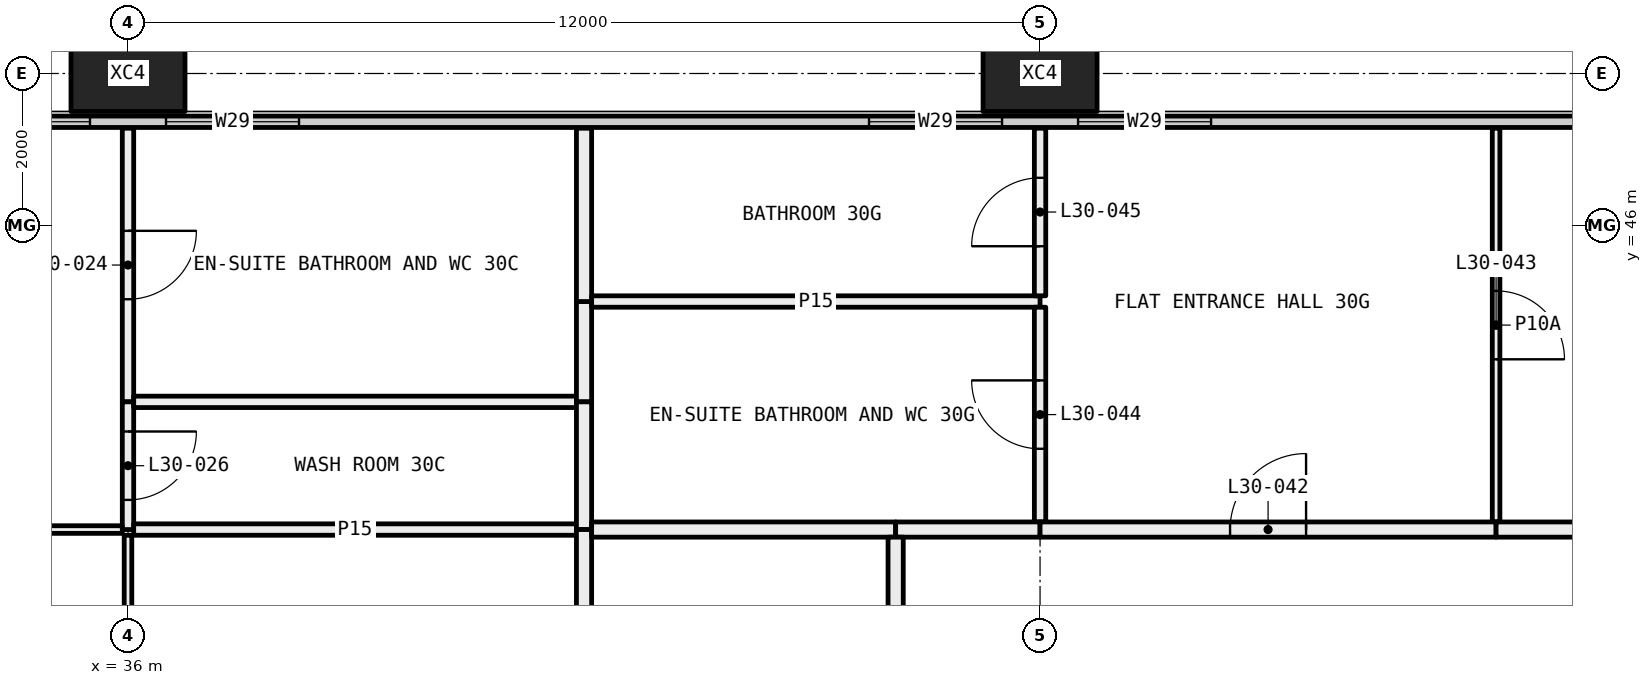
"""IFC4 building model, lengths in metres.
Left out: names, types, materials, properties, quantities, classifications, styles, units other than length and angle.
Written with IfcOpenShell. Run it as: python <this file> out.ifc"""

import sys

from ifc_helpers import new_model, si_unit, direction, frame, frame_2d, origin, origin_2d, place, context, subcontext, project, spatial, rectangle, hollow_rectangle, extrude, element, fill, save


model = new_model("IFC4")
c1 = context("Model", 3, precision=1e-05, world=origin(), true_north=direction((0.0, 1.0)))
c2 = subcontext(c1, "Body", "Model", "MODEL_VIEW")
j1 = project(units=[si_unit("LENGTHUNIT", "METRE"), si_unit("PLANEANGLEUNIT", "RADIAN")], contexts=[c1])
p1 = place(None, origin())
s1 = spatial("IfcSite", under=j1, at=p1, CompositionType="ELEMENT")
p2 = place(p1, origin())
s2 = spatial("IfcBuilding", under=s1, at=p2, CompositionType="ELEMENT")
p3 = place(p2, frame((0.0, 0.0, 117.3)))
s3 = spatial("IfcBuildingStorey", under=s2, at=p3, CompositionType="ELEMENT", Elevation=117.3)
for number, where, z_axis, x_axis in (
    (1, (36.0, 48.0, -0.4), (0.0, 0.0, 1.0), (1.0, 0.0, 0.0)),
    (2, (48.0, 48.0, -0.4), (0.0, 0.0, 1.0), (1.0, 0.0, 0.0)),
):
    element("IfcColumn", number, at=place(p3, frame(where, z_axis=z_axis, x_axis=x_axis)), inside=s3, PredefinedType="COLUMN", context=c2, shape_type="SweptSolid", body=[
        extrude(hollow_rectangle(XDim=1.5, YDim=1.0, WallThickness=0.06, at=origin_2d()), origin(), (0.0, 0.0, 1.0), 3.45),
    ])
p4 = place(p3, frame((6.56, 47.365, 0.0), z_axis=(0.0, 0.0, 1.0), x_axis=(1.0, 0.0, 0.0)))
e3 = element("IfcWall", 3, at=p4, inside=s3, PredefinedType="ELEMENTEDWALL", context=c2, shape_type="SweptSolid", body=[
    extrude(rectangle(XDim=58.88, YDim=0.15, at=frame_2d((29.44, 0.0))), origin(), (0.0, 0.0, 1.0), 3.05),
])
p5 = place(p4, frame((0.44, 0.0, 0.45)))
e4 = element("IfcOpeningElement", 4, at=p5, cuts=e3, PredefinedType="OPENING", context=c2, shape_type="SweptSolid", body=[
    extrude(rectangle(XDim=4.5, YDim=2.55, at=frame_2d((2.25, 1.275))), frame((0.0, 0.085, 0.0), z_axis=(0.0, -1.0, 0.0), x_axis=(1.0, 0.0, 0.0)), (0.0, 0.0, 1.0), 0.17),
])
p6 = place(p4, frame((5.94, 0.0, 0.45)))
e5 = element("IfcOpeningElement", 5, at=p6, cuts=e3, PredefinedType="OPENING", context=c2, shape_type="SweptSolid", body=[
    extrude(rectangle(XDim=1.75, YDim=2.55, at=frame_2d((0.875, 1.275))), frame((0.0, 0.085, 0.0), z_axis=(0.0, -1.0, 0.0), x_axis=(1.0, 0.0, 0.0)), (0.0, 0.0, 1.0), 0.17),
])
p7 = place(p4, frame((15.19, 0.0, 0.45)))
e6 = element("IfcOpeningElement", 6, at=p7, cuts=e3, PredefinedType="OPENING", context=c2, shape_type="SweptSolid", body=[
    extrude(rectangle(XDim=1.75, YDim=2.55, at=frame_2d((0.875, 1.275))), frame((0.0, 0.085, 0.0), z_axis=(0.0, -1.0, 0.0), x_axis=(1.0, 0.0, 0.0)), (0.0, 0.0, 1.0), 0.17),
])
p8 = place(p4, frame((17.94, 0.0, 0.45)))
e7 = element("IfcOpeningElement", 7, at=p8, cuts=e3, PredefinedType="OPENING", context=c2, shape_type="SweptSolid", body=[
    extrude(rectangle(XDim=1.75, YDim=2.55, at=frame_2d((0.875, 1.275))), frame((0.0, 0.085, 0.0), z_axis=(0.0, -1.0, 0.0), x_axis=(1.0, 0.0, 0.0)), (0.0, 0.0, 1.0), 0.17),
])
p9 = place(p4, frame((27.19, 0.0, 0.45)))
e8 = element("IfcOpeningElement", 8, at=p9, cuts=e3, PredefinedType="OPENING", context=c2, shape_type="SweptSolid", body=[
    extrude(rectangle(XDim=1.75, YDim=2.55, at=frame_2d((0.875, 1.275))), frame((0.0, 0.085, 0.0), z_axis=(0.0, -1.0, 0.0), x_axis=(1.0, 0.0, 0.0)), (0.0, 0.0, 1.0), 0.17),
])
p10 = place(p4, frame((29.94, 0.0, 0.45)))
e9 = element("IfcOpeningElement", 9, at=p10, cuts=e3, PredefinedType="OPENING", context=c2, shape_type="SweptSolid", body=[
    extrude(rectangle(XDim=1.75, YDim=2.55, at=frame_2d((0.875, 1.275))), frame((0.0, 0.085, 0.0), z_axis=(0.0, -1.0, 0.0), x_axis=(1.0, 0.0, 0.0)), (0.0, 0.0, 1.0), 0.17),
])
p11 = place(p4, frame((39.19, 0.0, 0.45)))
e10 = element("IfcOpeningElement", 10, at=p11, cuts=e3, PredefinedType="OPENING", context=c2, shape_type="SweptSolid", body=[
    extrude(rectangle(XDim=1.75, YDim=2.55, at=frame_2d((0.875, 1.275))), frame((0.0, 0.085, 0.0), z_axis=(0.0, -1.0, 0.0), x_axis=(1.0, 0.0, 0.0)), (0.0, 0.0, 1.0), 0.17),
])
p12 = place(p4, frame((41.94, 0.0, 0.45)))
e11 = element("IfcOpeningElement", 11, at=p12, cuts=e3, PredefinedType="OPENING", context=c2, shape_type="SweptSolid", body=[
    extrude(rectangle(XDim=1.75, YDim=2.55, at=frame_2d((0.875, 1.275))), frame((0.0, 0.085, 0.0), z_axis=(0.0, -1.0, 0.0), x_axis=(1.0, 0.0, 0.0)), (0.0, 0.0, 1.0), 0.17),
])
p13 = place(p4, frame((51.19, 0.0, 0.45)))
e12 = element("IfcOpeningElement", 12, at=p13, cuts=e3, PredefinedType="OPENING", context=c2, shape_type="SweptSolid", body=[
    extrude(rectangle(XDim=1.75, YDim=2.55, at=frame_2d((0.875, 1.275))), frame((0.0, 0.085, 0.0), z_axis=(0.0, -1.0, 0.0), x_axis=(1.0, 0.0, 0.0)), (0.0, 0.0, 1.0), 0.17),
])
p14 = place(p4, frame((53.94, 0.0, 0.45)))
e13 = element("IfcOpeningElement", 13, at=p14, cuts=e3, PredefinedType="OPENING", context=c2, shape_type="SweptSolid", body=[
    extrude(rectangle(XDim=4.5, YDim=2.55, at=frame_2d((2.25, 1.275))), frame((0.0, 0.085, 0.0), z_axis=(0.0, -1.0, 0.0), x_axis=(1.0, 0.0, 0.0)), (0.0, 0.0, 1.0), 0.17),
])
p15 = place(p3, frame((36.0, 43.68, 0.0), z_axis=(0.0, 0.0, 1.0), x_axis=(0.0, 1.0, 0.0)))
e14 = element("IfcWall", 14, at=p15, inside=s3, PredefinedType="PARTITIONING", context=c2, shape_type="SweptSolid", body=[
    extrude(rectangle(XDim=3.6, YDim=0.15, at=frame_2d((1.8, 0.0))), origin(), (0.0, 0.0, 1.0), 2.45),
])
p16 = place(p15, frame((1.35, 0.0, 0.0)))
e15 = element("IfcOpeningElement", 15, at=p16, cuts=e14, PredefinedType="OPENING", context=c2, shape_type="SweptSolid", body=[
    extrude(rectangle(XDim=0.9, YDim=2.1, at=frame_2d((0.45, 1.05))), frame((0.0, 0.085, 0.0), z_axis=(0.0, -1.0, 0.0), x_axis=(1.0, 0.0, 0.0)), (0.0, 0.0, 1.0), 0.17),
])
p17 = place(p3, frame((36.0, 42.0, 0.0), z_axis=(0.0, 0.0, 1.0), x_axis=(0.0, 1.0, 0.0)))
e16 = element("IfcWall", 16, at=p17, inside=s3, PredefinedType="PARTITIONING", context=c2, shape_type="SweptSolid", body=[
    extrude(rectangle(XDim=1.68, YDim=0.15, at=frame_2d((0.84, 0.0))), origin(), (0.0, 0.0, 1.0), 2.45),
])
p18 = place(p17, frame((0.39, 0.0, 0.0)))
e17 = element("IfcOpeningElement", 17, at=p18, cuts=e16, PredefinedType="OPENING", context=c2, shape_type="SweptSolid", body=[
    extrude(rectangle(XDim=0.9, YDim=2.1, at=frame_2d((0.45, 1.05))), frame((0.0, 0.085, 0.0), z_axis=(0.0, -1.0, 0.0), x_axis=(1.0, 0.0, 0.0)), (0.0, 0.0, 1.0), 0.17),
])
p19 = place(p3, frame((31.5, 42.0, 0.0), z_axis=(0.0, 0.0, 1.0), x_axis=(1.0, 0.0, 0.0)))
e18 = element("IfcWall", 18, at=p19, inside=s3, PredefinedType="PARTITIONING", context=c2, shape_type="SweptSolid", body=[
    extrude(rectangle(XDim=4.425, YDim=0.1, at=frame_2d((2.212, 0.0))), origin(), (0.0, 0.0, 1.0), 2.45),
])
p20 = place(p19, frame((1.762, 0.0, 0.0)))
e19 = element("IfcOpeningElement", 19, at=p20, cuts=e18, PredefinedType="OPENING", context=c2, shape_type="SweptSolid", body=[
    extrude(rectangle(XDim=0.9, YDim=2.1, at=frame_2d((0.45, 1.05))), frame((0.0, 0.06, 0.0), z_axis=(0.0, -1.0, 0.0), x_axis=(1.0, 0.0, 0.0)), (0.0, 0.0, 1.0), 0.12),
])
p21 = place(p3, frame((36.075, 43.68, 0.0), z_axis=(0.0, 0.0, 1.0), x_axis=(1.0, 0.0, 0.0)))
e20 = element("IfcWall", 20, at=p21, inside=s3, PredefinedType="PARTITIONING", context=c2, shape_type="SweptSolid", body=[
    extrude(rectangle(XDim=5.825, YDim=0.15, at=frame_2d((2.913, 0.0))), origin(), (0.0, 0.0, 1.0), 2.45),
])
p22 = place(p3, frame((42.0, 43.68, 0.0), z_axis=(0.0, 0.0, 1.0), x_axis=(0.0, 1.0, 0.0)))
e21 = element("IfcWall", 21, at=p22, inside=s3, PredefinedType="PARTITIONING", context=c2, shape_type="SweptSolid", body=[
    extrude(rectangle(XDim=1.32, YDim=0.2, at=frame_2d((0.66, 0.0))), origin(), (0.0, 0.0, 1.0), 3.05),
])
p23 = place(p3, frame((42.0, 45.0, 0.0), z_axis=(0.0, 0.0, 1.0), x_axis=(0.0, 1.0, 0.0)))
e22 = element("IfcWall", 22, at=p23, inside=s3, PredefinedType="PARTITIONING", context=c2, shape_type="SweptSolid", body=[
    extrude(rectangle(XDim=2.28, YDim=0.2, at=frame_2d((1.14, 0.0))), origin(), (0.0, 0.0, 1.0), 3.05),
])
p24 = place(p3, frame((36.075, 42.0, 0.0), z_axis=(0.0, 0.0, 1.0), x_axis=(1.0, 0.0, 0.0)))
e23 = element("IfcWall", 23, at=p24, inside=s3, PredefinedType="PARTITIONING", context=c2, shape_type="SweptSolid", body=[
    extrude(rectangle(XDim=5.825, YDim=0.15, at=frame_2d((2.913, 0.0))), origin(), (0.0, 0.0, 1.0), 2.45),
])
p25 = place(p3, frame((42.0, 42.0, 0.0), z_axis=(0.0, 0.0, 1.0), x_axis=(0.0, 1.0, 0.0)))
e24 = element("IfcWall", 24, at=p25, inside=s3, PredefinedType="PARTITIONING", context=c2, shape_type="SweptSolid", body=[
    extrude(rectangle(XDim=1.68, YDim=0.2, at=frame_2d((0.84, 0.0))), origin(), (0.0, 0.0, 1.0), 3.05),
])
p26 = place(p3, frame((36.0, 36.75, 0.0), z_axis=(0.0, 0.0, 1.0), x_axis=(0.0, 1.0, 0.0)))
e25 = element("IfcWall", 25, at=p26, inside=s3, PredefinedType="PARTITIONING", context=c2, shape_type="SweptSolid", body=[
    extrude(rectangle(XDim=5.175, YDim=0.1, at=frame_2d((2.587, 0.0))), origin(), (0.0, 0.0, 1.0), 2.45),
])
p27 = place(p26, frame((2.137, 0.0, 0.0)))
e26 = element("IfcOpeningElement", 26, at=p27, cuts=e25, PredefinedType="OPENING", context=c2, shape_type="SweptSolid", body=[
    extrude(rectangle(XDim=0.9, YDim=2.1, at=frame_2d((0.45, 1.05))), frame((0.0, 0.06, 0.0), z_axis=(0.0, -1.0, 0.0), x_axis=(1.0, 0.0, 0.0)), (0.0, 0.0, 1.0), 0.12),
])
p28 = place(p3, frame((42.0, 36.1, 0.0), z_axis=(0.0, 0.0, 1.0), x_axis=(0.0, 1.0, 0.0)))
e27 = element("IfcWall", 27, at=p28, inside=s3, PredefinedType="PARTITIONING", context=c2, shape_type="SweptSolid", body=[
    extrude(rectangle(XDim=5.9, YDim=0.2, at=frame_2d((2.95, 0.0))), origin(), (0.0, 0.0, 1.0), 3.05),
])
p29 = place(p3, frame((48.0, 45.0, 0.0), z_axis=(0.0, 0.0, 1.0), x_axis=(-1.0, 0.0, 0.0)))
e28 = element("IfcWall", 28, at=p29, inside=s3, PredefinedType="PARTITIONING", context=c2, shape_type="SweptSolid", body=[
    extrude(rectangle(XDim=5.9, YDim=0.15, at=frame_2d((2.95, 0.0))), origin(), (0.0, 0.0, 1.0), 3.05),
])
p30 = place(p3, frame((48.0, 42.1, 0.0), z_axis=(0.0, 0.0, 1.0), x_axis=(0.0, 1.0, 0.0)))
e29 = element("IfcWall", 29, at=p30, inside=s3, PredefinedType="PARTITIONING", context=c2, shape_type="SweptSolid", body=[
    extrude(rectangle(XDim=2.825, YDim=0.15, at=frame_2d((1.413, 0.0))), origin(), (0.0, 0.0, 1.0), 3.05),
])
p31 = place(p30, frame((0.962, 0.0, 0.0)))
e30 = element("IfcOpeningElement", 30, at=p31, cuts=e29, PredefinedType="OPENING", context=c2, shape_type="SweptSolid", body=[
    extrude(rectangle(XDim=0.9, YDim=2.1, at=frame_2d((0.45, 1.05))), frame((0.0, 0.085, 0.0), z_axis=(0.0, -1.0, 0.0), x_axis=(1.0, 0.0, 0.0)), (0.0, 0.0, 1.0), 0.17),
])
p32 = place(p3, frame((42.1, 42.0, 0.0), z_axis=(0.0, 0.0, 1.0), x_axis=(1.0, 0.0, 0.0)))
e31 = element("IfcWall", 31, at=p32, inside=s3, PredefinedType="PARTITIONING", context=c2, shape_type="SweptSolid", body=[
    extrude(rectangle(XDim=4.0, YDim=0.2, at=frame_2d((2.0, 0.0))), origin(), (0.0, 0.0, 1.0), 3.05),
])
p33 = place(p3, frame((46.1, 42.0, 0.0), z_axis=(0.0, 0.0, 1.0), x_axis=(1.0, 0.0, 0.0)))
e32 = element("IfcWall", 32, at=p33, inside=s3, PredefinedType="PARTITIONING", context=c2, shape_type="SweptSolid", body=[
    extrude(rectangle(XDim=1.9, YDim=0.2, at=frame_2d((0.95, 0.0))), origin(), (0.0, 0.0, 1.0), 3.05),
])
p34 = place(p3, frame((48.0, 45.075, 0.0), z_axis=(0.0, 0.0, 1.0), x_axis=(0.0, 1.0, 0.0)))
e33 = element("IfcWall", 33, at=p34, inside=s3, PredefinedType="PARTITIONING", context=c2, shape_type="SweptSolid", body=[
    extrude(rectangle(XDim=2.205, YDim=0.15, at=frame_2d((1.103, 0.0))), origin(), (0.0, 0.0, 1.0), 3.05),
])
p35 = place(p34, frame((0.653, 0.0, 0.0)))
e34 = element("IfcOpeningElement", 34, at=p35, cuts=e33, PredefinedType="OPENING", context=c2, shape_type="SweptSolid", body=[
    extrude(rectangle(XDim=0.9, YDim=2.1, at=frame_2d((0.45, 1.05))), frame((0.0, 0.085, 0.0), z_axis=(0.0, -1.0, 0.0), x_axis=(1.0, 0.0, 0.0)), (0.0, 0.0, 1.0), 0.17),
])
p36 = place(p3, frame((54.0, 42.1, 0.0), z_axis=(0.0, 0.0, 1.0), x_axis=(0.0, 1.0, 0.0)))
e35 = element("IfcWall", 35, at=p36, inside=s3, PredefinedType="PARTITIONING", context=c2, shape_type="SweptSolid", body=[
    extrude(rectangle(XDim=5.18, YDim=0.1, at=frame_2d((2.59, 0.0))), origin(), (0.0, 0.0, 1.0), 3.05),
])
p37 = place(p36, frame((2.14, 0.0, 0.0)))
e36 = element("IfcOpeningElement", 36, at=p37, cuts=e35, PredefinedType="OPENING", context=c2, shape_type="SweptSolid", body=[
    extrude(rectangle(XDim=0.9, YDim=2.1, at=frame_2d((0.45, 1.05))), frame((0.0, 0.06, 0.0), z_axis=(0.0, -1.0, 0.0), x_axis=(1.0, 0.0, 0.0)), (0.0, 0.0, 1.0), 0.12),
])
p38 = place(p3, frame((48.0, 42.0, 0.0), z_axis=(0.0, 0.0, 1.0), x_axis=(1.0, 0.0, 0.0)))
e37 = element("IfcWall", 37, at=p38, inside=s3, PredefinedType="PARTITIONING", context=c2, shape_type="SweptSolid", body=[
    extrude(rectangle(XDim=6.0, YDim=0.2, at=frame_2d((3.0, 0.0))), origin(), (0.0, 0.0, 1.0), 3.05),
])
p39 = place(p38, frame((2.5, 0.0, 0.0)))
e38 = element("IfcOpeningElement", 38, at=p39, cuts=e37, PredefinedType="OPENING", context=c2, shape_type="SweptSolid", body=[
    extrude(rectangle(XDim=1.0, YDim=2.1, at=frame_2d((0.5, 1.05))), frame((0.0, 0.11, 0.0), z_axis=(0.0, -1.0, 0.0), x_axis=(1.0, 0.0, 0.0)), (0.0, 0.0, 1.0), 0.22),
])
p40 = place(p3, frame((54.0, 42.0, 0.0), z_axis=(0.0, 0.0, 1.0), x_axis=(1.0, 0.0, 0.0)))
e39 = element("IfcWall", 39, at=p40, inside=s3, PredefinedType="PARTITIONING", context=c2, shape_type="SweptSolid", body=[
    extrude(rectangle(XDim=7.8, YDim=0.2, at=frame_2d((3.9, 0.0))), origin(), (0.0, 0.0, 1.0), 3.05),
])
p41 = place(p3, frame((46.1, 36.1, 0.0), z_axis=(0.0, 0.0, 1.0), x_axis=(0.0, 1.0, 0.0)))
e40 = element("IfcWall", 40, at=p41, inside=s3, PredefinedType="PARTITIONING", context=c2, shape_type="SweptSolid", body=[
    extrude(rectangle(XDim=5.8, YDim=0.2, at=frame_2d((2.9, 0.0))), origin(), (0.0, 0.0, 1.0), 3.05),
])
p42 = place(p41, frame((2.45, 0.0, 0.0)))
e41 = element("IfcOpeningElement", 41, at=p42, cuts=e40, PredefinedType="OPENING", context=c2, shape_type="SweptSolid", body=[
    extrude(rectangle(XDim=0.9, YDim=2.1, at=frame_2d((0.45, 1.05))), frame((0.0, 0.11, 0.0), z_axis=(0.0, -1.0, 0.0), x_axis=(1.0, 0.0, 0.0)), (0.0, 0.0, 1.0), 0.22),
])
p43 = place(p9, origin())
e42 = element("IfcWindow", 42, at=p43, inside=s3, PartitioningType="SINGLE_PANEL", PredefinedType="WINDOW", context=c2, shape_type="SweptSolid", body=[
    extrude(rectangle(XDim=1.75, YDim=2.55, at=frame_2d((0.875, 1.275))), frame((0.0, 0.03, 0.0), z_axis=(0.0, -1.0, 0.0), x_axis=(1.0, 0.0, 0.0)), (0.0, 0.0, 1.0), 0.06),
])
fill(e8, e42)
p44 = place(p10, origin())
e43 = element("IfcWindow", 43, at=p44, inside=s3, PartitioningType="SINGLE_PANEL", PredefinedType="WINDOW", context=c2, shape_type="SweptSolid", body=[
    extrude(rectangle(XDim=1.75, YDim=2.55, at=frame_2d((0.875, 1.275))), frame((0.0, 0.03, 0.0), z_axis=(0.0, -1.0, 0.0), x_axis=(1.0, 0.0, 0.0)), (0.0, 0.0, 1.0), 0.06),
])
fill(e9, e43)
p45 = place(p11, origin())
e44 = element("IfcWindow", 44, at=p45, inside=s3, PartitioningType="SINGLE_PANEL", PredefinedType="WINDOW", context=c2, shape_type="SweptSolid", body=[
    extrude(rectangle(XDim=1.75, YDim=2.55, at=frame_2d((0.875, 1.275))), frame((0.0, 0.03, 0.0), z_axis=(0.0, -1.0, 0.0), x_axis=(1.0, 0.0, 0.0)), (0.0, 0.0, 1.0), 0.06),
])
fill(e10, e44)
p46 = place(p12, origin())
e45 = element("IfcWindow", 45, at=p46, inside=s3, PartitioningType="SINGLE_PANEL", PredefinedType="WINDOW", context=c2, shape_type="SweptSolid", body=[
    extrude(rectangle(XDim=1.75, YDim=2.55, at=frame_2d((0.875, 1.275))), frame((0.0, 0.03, 0.0), z_axis=(0.0, -1.0, 0.0), x_axis=(1.0, 0.0, 0.0)), (0.0, 0.0, 1.0), 0.06),
])
fill(e11, e45)
p47 = place(p16, frame((0.9, 0.0, 0.0), x_axis=(-1.0, 0.0, 0.0)))
e46 = element("IfcDoor", 46, at=p47, inside=s3, OperationType="SINGLE_SWING_RIGHT", PredefinedType="DOOR", context=c2, shape_type="SweptSolid", body=[
    extrude(rectangle(XDim=0.9, YDim=2.1, at=frame_2d((0.45, 1.05))), frame((0.0, 0.025, 0.0), z_axis=(0.0, -1.0, 0.0), x_axis=(1.0, 0.0, 0.0)), (0.0, 0.0, 1.0), 0.05),
])
fill(e15, e46)
p48 = place(p18, frame((0.9, 0.0, 0.0), x_axis=(-1.0, 0.0, 0.0)))
e47 = element("IfcDoor", 47, at=p48, inside=s3, OperationType="SINGLE_SWING_RIGHT", PredefinedType="DOOR", context=c2, shape_type="SweptSolid", body=[
    extrude(rectangle(XDim=0.9, YDim=2.1, at=frame_2d((0.45, 1.05))), frame((0.0, 0.025, 0.0), z_axis=(0.0, -1.0, 0.0), x_axis=(1.0, 0.0, 0.0)), (0.0, 0.0, 1.0), 0.05),
])
fill(e17, e47)
p49 = place(p39, origin())
e48 = element("IfcDoor", 48, at=p49, inside=s3, OperationType="SINGLE_SWING_LEFT", PredefinedType="DOOR", context=c2, shape_type="SweptSolid", body=[
    extrude(rectangle(XDim=1.0, YDim=2.1, at=frame_2d((0.5, 1.05))), frame((0.0, 0.025, 0.0), z_axis=(0.0, -1.0, 0.0), x_axis=(1.0, 0.0, 0.0)), (0.0, 0.0, 1.0), 0.05),
])
fill(e38, e48)
p50 = place(p37, frame((0.9, 0.0, 0.0), x_axis=(-1.0, 0.0, 0.0)))
e49 = element("IfcDoor", 49, at=p50, inside=s3, OperationType="SINGLE_SWING_LEFT", PredefinedType="DOOR", context=c2, shape_type="SweptSolid", body=[
    extrude(rectangle(XDim=0.9, YDim=2.1, at=frame_2d((0.45, 1.05))), frame((0.0, 0.025, 0.0), z_axis=(0.0, -1.0, 0.0), x_axis=(1.0, 0.0, 0.0)), (0.0, 0.0, 1.0), 0.05),
])
fill(e36, e49)
p51 = place(p31, origin())
e50 = element("IfcDoor", 50, at=p51, inside=s3, OperationType="SINGLE_SWING_LEFT", PredefinedType="DOOR", context=c2, shape_type="SweptSolid", body=[
    extrude(rectangle(XDim=0.9, YDim=2.1, at=frame_2d((0.45, 1.05))), frame((0.0, 0.025, 0.0), z_axis=(0.0, -1.0, 0.0), x_axis=(1.0, 0.0, 0.0)), (0.0, 0.0, 1.0), 0.05),
])
fill(e30, e50)
p52 = place(p35, origin())
e51 = element("IfcDoor", 51, at=p52, inside=s3, OperationType="SINGLE_SWING_RIGHT", PredefinedType="DOOR", context=c2, shape_type="SweptSolid", body=[
    extrude(rectangle(XDim=0.9, YDim=2.1, at=frame_2d((0.45, 1.05))), frame((0.0, 0.025, 0.0), z_axis=(0.0, -1.0, 0.0), x_axis=(1.0, 0.0, 0.0)), (0.0, 0.0, 1.0), 0.05),
])
fill(e34, e51)
save(model, sys.argv[1])
